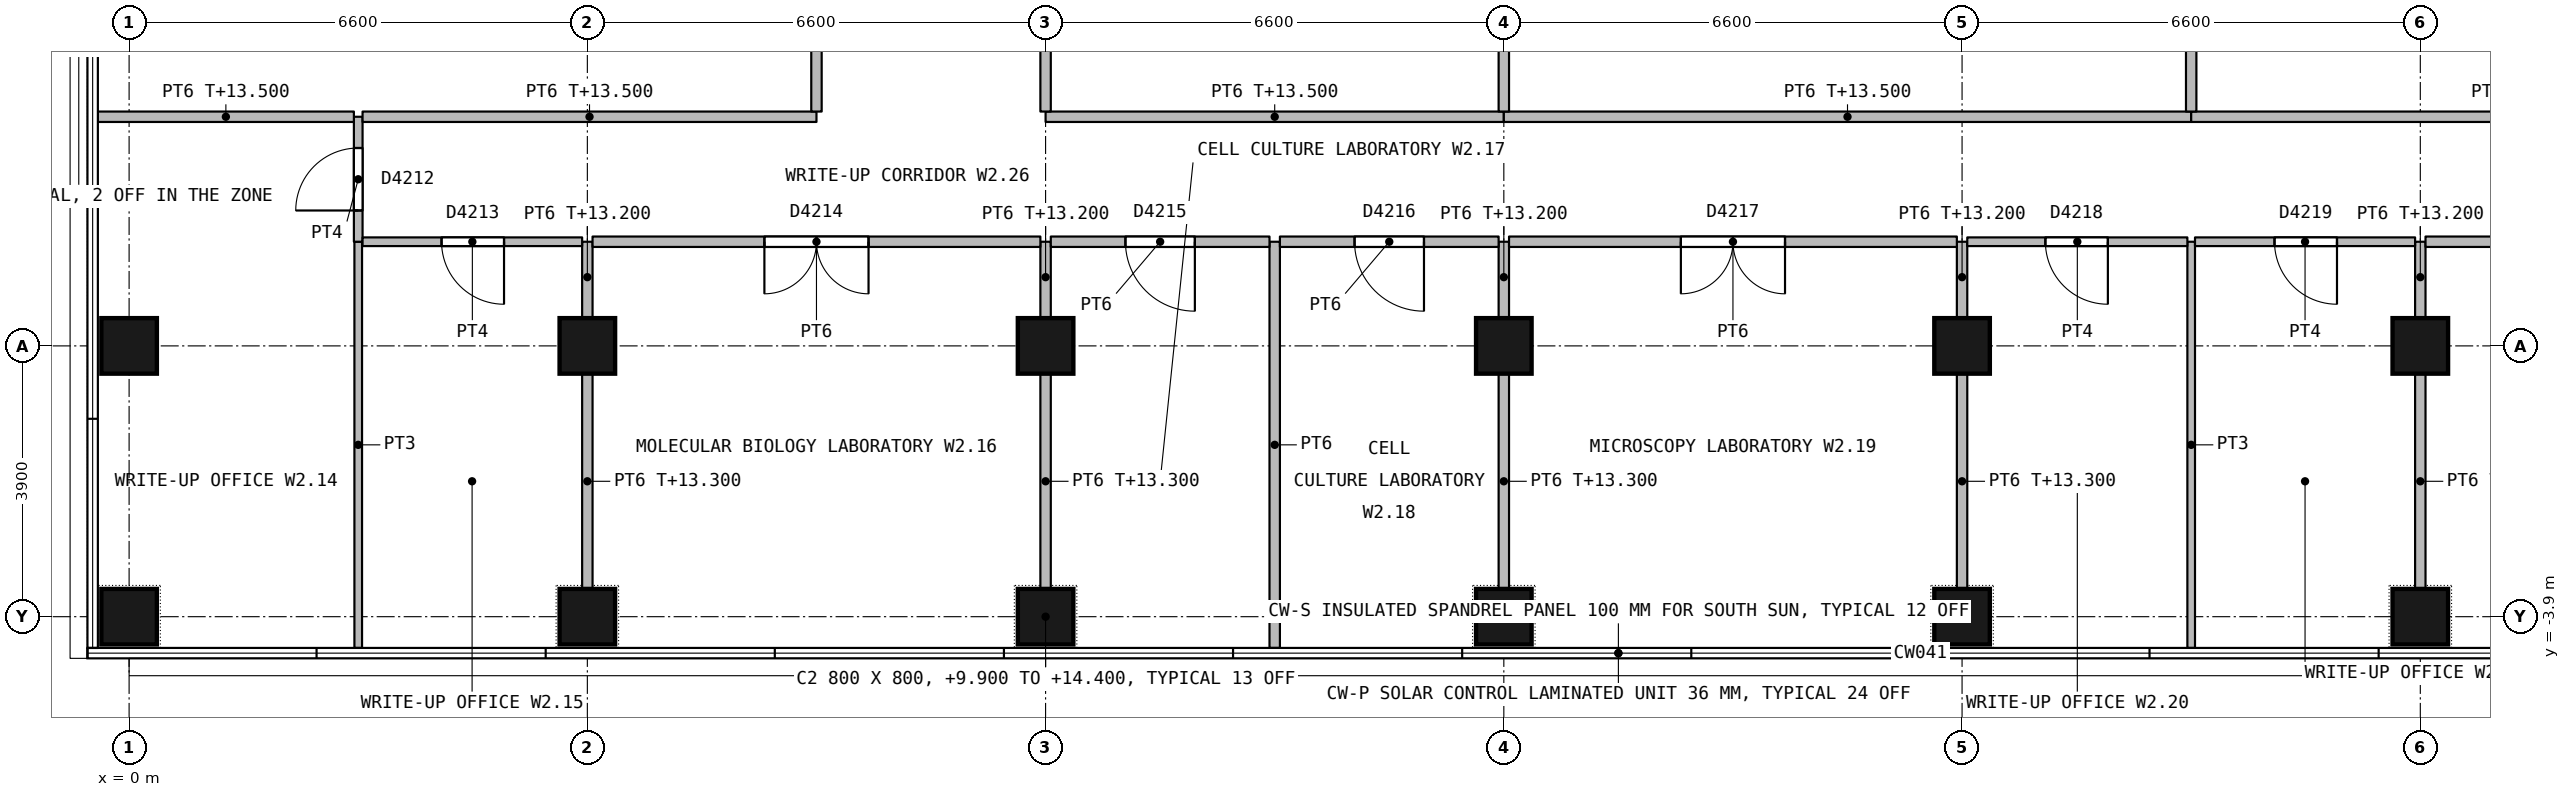
"""IFC4 building model, lengths in metres.
Left out: names, types, materials, properties, quantities, classifications, styles, units other than length and angle.
Written with IfcOpenShell. Run it as: python <this file> out.ifc"""

import sys

from ifc_helpers import new_model, si_unit, direction, frame, frame_2d, origin, origin_2d, place, context, subcontext, project, spatial, rectangle, extrude, element, fill, save


model = new_model("IFC4")
c1 = context("Model", 3, precision=1e-05, world=origin(), true_north=direction((0.0, 1.0)))
c2 = subcontext(c1, "Body", "Model", "MODEL_VIEW")
j1 = project(units=[si_unit("LENGTHUNIT", "METRE"), si_unit("PLANEANGLEUNIT", "RADIAN")], contexts=[c1])
p1 = place(None, origin())
s1 = spatial("IfcSite", under=j1, at=p1, CompositionType="ELEMENT")
p2 = place(p1, origin())
s2 = spatial("IfcBuilding", under=s1, at=p2, CompositionType="ELEMENT")
p3 = place(p2, frame((0.0, 0.0, 9.9)))
s3 = spatial("IfcBuildingStorey", under=s2, at=p3, CompositionType="ELEMENT", Elevation=9.9)
for number, where, z_axis, x_axis in (
    (1, (0.0, 0.0, 0.0), (0.0, 0.0, 1.0), (1.0, 0.0, 0.0)),
    (2, (6.6, 0.0, 0.0), (0.0, 0.0, 1.0), (1.0, 0.0, 0.0)),
    (3, (13.2, 0.0, 0.0), (0.0, 0.0, 1.0), (1.0, 0.0, 0.0)),
    (4, (19.8, 0.0, 0.0), (0.0, 0.0, 1.0), (1.0, 0.0, 0.0)),
    (5, (26.4, 0.0, 0.0), (0.0, 0.0, 1.0), (1.0, 0.0, 0.0)),
    (6, (33.0, 0.0, 0.0), (0.0, 0.0, 1.0), (1.0, 0.0, 0.0)),
    (7, (0.0, -3.9, 0.0), (0.0, 0.0, 1.0), (1.0, 0.0, 0.0)),
    (8, (6.6, -3.9, 0.0), (0.0, 0.0, 1.0), (1.0, 0.0, 0.0)),
    (9, (13.2, -3.9, 0.0), (0.0, 0.0, 1.0), (1.0, 0.0, 0.0)),
    (10, (19.8, -3.9, 0.0), (0.0, 0.0, 1.0), (1.0, 0.0, 0.0)),
    (11, (26.4, -3.9, 0.0), (0.0, 0.0, 1.0), (1.0, 0.0, 0.0)),
    (12, (33.0, -3.9, 0.0), (0.0, 0.0, 1.0), (1.0, 0.0, 0.0)),
):
    element("IfcColumn", number, at=place(p3, frame(where, z_axis=z_axis, x_axis=x_axis)), inside=s3, PredefinedType="COLUMN", context=c2, shape_type="SweptSolid", body=[
        extrude(rectangle(XDim=0.8, YDim=0.8, at=origin_2d()), origin(), (0.0, 0.0, 1.0), 4.5),
    ])
p4 = place(p3, frame((3.3, -4.35, 0.0), z_axis=(0.0, 0.0, 1.0), x_axis=(0.0, 1.0, 0.0)))
e13 = element("IfcWall", 13, at=p4, inside=s3, PredefinedType="PARTITIONING", context=c2, shape_type="SweptSolid", body=[
    extrude(rectangle(XDim=5.85, YDim=0.11, at=frame_2d((2.925, 0.0))), origin(), (0.0, 0.0, 1.0), 4.2),
])
p5 = place(p3, frame((3.3, 1.5, 0.0), z_axis=(0.0, 0.0, 1.0), x_axis=(0.0, 1.0, 0.0)))
e14 = element("IfcWall", 14, at=p5, inside=s3, PredefinedType="PARTITIONING", context=c2, shape_type="SweptSolid", body=[
    extrude(rectangle(XDim=1.8, YDim=0.125, at=frame_2d((0.9, 0.0))), origin(), (0.0, 0.0, 1.0), 4.2),
])
p6 = place(p5, frame((0.45, 0.0, 0.0)))
e15 = element("IfcOpeningElement", 15, at=p6, cuts=e14, PredefinedType="OPENING", context=c2, shape_type="SweptSolid", body=[
    extrude(rectangle(XDim=0.9, YDim=2.1, at=frame_2d((0.45, 1.05))), frame((0.0, 0.073, 0.0), z_axis=(0.0, -1.0, 0.0), x_axis=(1.0, 0.0, 0.0)), (0.0, 0.0, 1.0), 0.145),
])
p7 = place(p3, frame((3.238, 3.3, 0.0), z_axis=(0.0, 0.0, 1.0), x_axis=(-1.0, 0.0, 0.0)))
e16 = element("IfcWall", 16, at=p7, inside=s3, PredefinedType="PARTITIONING", context=c2, shape_type="SweptSolid", body=[
    extrude(rectangle(XDim=3.688, YDim=0.15, at=frame_2d((1.844, 0.0))), origin(), (0.0, 0.0, 1.0), 3.6),
])
p8 = place(p3, frame((6.6, -3.5, 0.0), z_axis=(0.0, 0.0, 1.0), x_axis=(0.0, 1.0, 0.0)))
e17 = element("IfcWall", 17, at=p8, inside=s3, PredefinedType="PARTITIONING", context=c2, shape_type="SweptSolid", body=[
    extrude(rectangle(XDim=3.1, YDim=0.15, at=frame_2d((1.55, 0.0))), origin(), (0.0, 0.0, 1.0), 3.4),
])
p9 = place(p3, frame((6.6, 0.4, 0.0), z_axis=(0.0, 0.0, 1.0), x_axis=(0.0, 1.0, 0.0)))
e18 = element("IfcWall", 18, at=p9, inside=s3, PredefinedType="PARTITIONING", context=c2, shape_type="SweptSolid", body=[
    extrude(rectangle(XDim=1.1, YDim=0.15, at=frame_2d((0.55, 0.0))), origin(), (0.0, 0.0, 1.0), 3.3),
])
p10 = place(p3, frame((6.525, 1.5, 0.0), z_axis=(0.0, 0.0, 1.0), x_axis=(-1.0, 0.0, 0.0)))
e19 = element("IfcWall", 19, at=p10, inside=s3, PredefinedType="PARTITIONING", context=c2, shape_type="SweptSolid", body=[
    extrude(rectangle(XDim=3.162, YDim=0.125, at=frame_2d((1.581, 0.0))), origin(), (0.0, 0.0, 1.0), 4.2),
])
p11 = place(p10, frame((1.125, 0.0, 0.0)))
e20 = element("IfcOpeningElement", 20, at=p11, cuts=e19, PredefinedType="OPENING", context=c2, shape_type="SweptSolid", body=[
    extrude(rectangle(XDim=0.9, YDim=2.1, at=frame_2d((0.45, 1.05))), frame((0.0, 0.073, 0.0), z_axis=(0.0, -1.0, 0.0), x_axis=(1.0, 0.0, 0.0)), (0.0, 0.0, 1.0), 0.145),
])
p12 = place(p3, frame((13.2, -3.5, 0.0), z_axis=(0.0, 0.0, 1.0), x_axis=(0.0, 1.0, 0.0)))
e21 = element("IfcWall", 21, at=p12, inside=s3, PredefinedType="PARTITIONING", context=c2, shape_type="SweptSolid", body=[
    extrude(rectangle(XDim=3.1, YDim=0.15, at=frame_2d((1.55, 0.0))), origin(), (0.0, 0.0, 1.0), 3.4),
])
p13 = place(p3, frame((13.2, 0.4, 0.0), z_axis=(0.0, 0.0, 1.0), x_axis=(0.0, 1.0, 0.0)))
e22 = element("IfcWall", 22, at=p13, inside=s3, PredefinedType="PARTITIONING", context=c2, shape_type="SweptSolid", body=[
    extrude(rectangle(XDim=1.1, YDim=0.15, at=frame_2d((0.55, 0.0))), origin(), (0.0, 0.0, 1.0), 3.3),
])
p14 = place(p3, frame((13.125, 1.5, 0.0), z_axis=(0.0, 0.0, 1.0), x_axis=(-1.0, 0.0, 0.0)))
e23 = element("IfcWall", 23, at=p14, inside=s3, PredefinedType="PARTITIONING", context=c2, shape_type="SweptSolid", body=[
    extrude(rectangle(XDim=6.45, YDim=0.15, at=frame_2d((3.225, 0.0))), origin(), (0.0, 0.0, 1.0), 4.2),
])
p15 = place(p14, frame((2.475, 0.0, 0.0)))
e24 = element("IfcOpeningElement", 24, at=p15, cuts=e23, PredefinedType="OPENING", context=c2, shape_type="SweptSolid", body=[
    extrude(rectangle(XDim=1.5, YDim=2.1, at=frame_2d((0.75, 1.05))), frame((0.0, 0.085, 0.0), z_axis=(0.0, -1.0, 0.0), x_axis=(1.0, 0.0, 0.0)), (0.0, 0.0, 1.0), 0.17),
])
p16 = place(p3, frame((16.5, -4.35, 0.0), z_axis=(0.0, 0.0, 1.0), x_axis=(0.0, 1.0, 0.0)))
e25 = element("IfcWall", 25, at=p16, inside=s3, PredefinedType="PARTITIONING", context=c2, shape_type="SweptSolid", body=[
    extrude(rectangle(XDim=5.85, YDim=0.15, at=frame_2d((2.925, 0.0))), origin(), (0.0, 0.0, 1.0), 4.2),
])
p17 = place(p3, frame((16.425, 1.5, 0.0), z_axis=(0.0, 0.0, 1.0), x_axis=(-1.0, 0.0, 0.0)))
e26 = element("IfcWall", 26, at=p17, inside=s3, PredefinedType="PARTITIONING", context=c2, shape_type="SweptSolid", body=[
    extrude(rectangle(XDim=3.15, YDim=0.15, at=frame_2d((1.575, 0.0))), origin(), (0.0, 0.0, 1.0), 4.2),
])
p18 = place(p17, frame((1.075, 0.0, 0.0)))
e27 = element("IfcOpeningElement", 27, at=p18, cuts=e26, PredefinedType="OPENING", context=c2, shape_type="SweptSolid", body=[
    extrude(rectangle(XDim=1.0, YDim=2.1, at=frame_2d((0.5, 1.05))), frame((0.0, 0.085, 0.0), z_axis=(0.0, -1.0, 0.0), x_axis=(1.0, 0.0, 0.0)), (0.0, 0.0, 1.0), 0.17),
])
p19 = place(p3, frame((19.8, -3.5, 0.0), z_axis=(0.0, 0.0, 1.0), x_axis=(0.0, 1.0, 0.0)))
e28 = element("IfcWall", 28, at=p19, inside=s3, PredefinedType="PARTITIONING", context=c2, shape_type="SweptSolid", body=[
    extrude(rectangle(XDim=3.1, YDim=0.15, at=frame_2d((1.55, 0.0))), origin(), (0.0, 0.0, 1.0), 3.4),
])
p20 = place(p3, frame((19.8, 0.4, 0.0), z_axis=(0.0, 0.0, 1.0), x_axis=(0.0, 1.0, 0.0)))
e29 = element("IfcWall", 29, at=p20, inside=s3, PredefinedType="PARTITIONING", context=c2, shape_type="SweptSolid", body=[
    extrude(rectangle(XDim=1.1, YDim=0.15, at=frame_2d((0.55, 0.0))), origin(), (0.0, 0.0, 1.0), 3.3),
])
p21 = place(p3, frame((19.725, 1.5, 0.0), z_axis=(0.0, 0.0, 1.0), x_axis=(-1.0, 0.0, 0.0)))
e30 = element("IfcWall", 30, at=p21, inside=s3, PredefinedType="PARTITIONING", context=c2, shape_type="SweptSolid", body=[
    extrude(rectangle(XDim=3.15, YDim=0.15, at=frame_2d((1.575, 0.0))), origin(), (0.0, 0.0, 1.0), 4.2),
])
p22 = place(p21, frame((1.075, 0.0, 0.0)))
e31 = element("IfcOpeningElement", 31, at=p22, cuts=e30, PredefinedType="OPENING", context=c2, shape_type="SweptSolid", body=[
    extrude(rectangle(XDim=1.0, YDim=2.1, at=frame_2d((0.5, 1.05))), frame((0.0, 0.085, 0.0), z_axis=(0.0, -1.0, 0.0), x_axis=(1.0, 0.0, 0.0)), (0.0, 0.0, 1.0), 0.17),
])
p23 = place(p3, frame((26.4, -3.5, 0.0), z_axis=(0.0, 0.0, 1.0), x_axis=(0.0, 1.0, 0.0)))
e32 = element("IfcWall", 32, at=p23, inside=s3, PredefinedType="PARTITIONING", context=c2, shape_type="SweptSolid", body=[
    extrude(rectangle(XDim=3.1, YDim=0.15, at=frame_2d((1.55, 0.0))), origin(), (0.0, 0.0, 1.0), 3.4),
])
p24 = place(p3, frame((26.4, 0.4, 0.0), z_axis=(0.0, 0.0, 1.0), x_axis=(0.0, 1.0, 0.0)))
e33 = element("IfcWall", 33, at=p24, inside=s3, PredefinedType="PARTITIONING", context=c2, shape_type="SweptSolid", body=[
    extrude(rectangle(XDim=1.1, YDim=0.15, at=frame_2d((0.55, 0.0))), origin(), (0.0, 0.0, 1.0), 3.3),
])
p25 = place(p3, frame((26.325, 1.5, 0.0), z_axis=(0.0, 0.0, 1.0), x_axis=(-1.0, 0.0, 0.0)))
e34 = element("IfcWall", 34, at=p25, inside=s3, PredefinedType="PARTITIONING", context=c2, shape_type="SweptSolid", body=[
    extrude(rectangle(XDim=6.45, YDim=0.15, at=frame_2d((3.225, 0.0))), origin(), (0.0, 0.0, 1.0), 4.2),
])
p26 = place(p25, frame((2.475, 0.0, 0.0)))
e35 = element("IfcOpeningElement", 35, at=p26, cuts=e34, PredefinedType="OPENING", context=c2, shape_type="SweptSolid", body=[
    extrude(rectangle(XDim=1.5, YDim=2.1, at=frame_2d((0.75, 1.05))), frame((0.0, 0.085, 0.0), z_axis=(0.0, -1.0, 0.0), x_axis=(1.0, 0.0, 0.0)), (0.0, 0.0, 1.0), 0.17),
])
p27 = place(p3, frame((29.7, -4.35, 0.0), z_axis=(0.0, 0.0, 1.0), x_axis=(0.0, 1.0, 0.0)))
e36 = element("IfcWall", 36, at=p27, inside=s3, PredefinedType="PARTITIONING", context=c2, shape_type="SweptSolid", body=[
    extrude(rectangle(XDim=5.85, YDim=0.11, at=frame_2d((2.925, 0.0))), origin(), (0.0, 0.0, 1.0), 4.2),
])
p28 = place(p3, frame((29.645, 1.5, 0.0), z_axis=(0.0, 0.0, 1.0), x_axis=(-1.0, 0.0, 0.0)))
e37 = element("IfcWall", 37, at=p28, inside=s3, PredefinedType="PARTITIONING", context=c2, shape_type="SweptSolid", body=[
    extrude(rectangle(XDim=3.17, YDim=0.125, at=frame_2d((1.585, 0.0))), origin(), (0.0, 0.0, 1.0), 4.2),
])
p29 = place(p28, frame((1.145, 0.0, 0.0)))
e38 = element("IfcOpeningElement", 38, at=p29, cuts=e37, PredefinedType="OPENING", context=c2, shape_type="SweptSolid", body=[
    extrude(rectangle(XDim=0.9, YDim=2.1, at=frame_2d((0.45, 1.05))), frame((0.0, 0.073, 0.0), z_axis=(0.0, -1.0, 0.0), x_axis=(1.0, 0.0, 0.0)), (0.0, 0.0, 1.0), 0.145),
])
p30 = place(p3, frame((33.0, -3.5, 0.0), z_axis=(0.0, 0.0, 1.0), x_axis=(0.0, 1.0, 0.0)))
e39 = element("IfcWall", 39, at=p30, inside=s3, PredefinedType="PARTITIONING", context=c2, shape_type="SweptSolid", body=[
    extrude(rectangle(XDim=3.1, YDim=0.15, at=frame_2d((1.55, 0.0))), origin(), (0.0, 0.0, 1.0), 3.4),
])
p31 = place(p3, frame((33.0, 0.4, 0.0), z_axis=(0.0, 0.0, 1.0), x_axis=(0.0, 1.0, 0.0)))
e40 = element("IfcWall", 40, at=p31, inside=s3, PredefinedType="PARTITIONING", context=c2, shape_type="SweptSolid", body=[
    extrude(rectangle(XDim=1.1, YDim=0.15, at=frame_2d((0.55, 0.0))), origin(), (0.0, 0.0, 1.0), 3.3),
])
p32 = place(p3, frame((32.925, 1.5, 0.0), z_axis=(0.0, 0.0, 1.0), x_axis=(-1.0, 0.0, 0.0)))
e41 = element("IfcWall", 41, at=p32, inside=s3, PredefinedType="PARTITIONING", context=c2, shape_type="SweptSolid", body=[
    extrude(rectangle(XDim=3.17, YDim=0.125, at=frame_2d((1.585, 0.0))), origin(), (0.0, 0.0, 1.0), 4.2),
])
p33 = place(p32, frame((1.125, 0.0, 0.0)))
e42 = element("IfcOpeningElement", 42, at=p33, cuts=e41, PredefinedType="OPENING", context=c2, shape_type="SweptSolid", body=[
    extrude(rectangle(XDim=0.9, YDim=2.1, at=frame_2d((0.45, 1.05))), frame((0.0, 0.073, 0.0), z_axis=(0.0, -1.0, 0.0), x_axis=(1.0, 0.0, 0.0)), (0.0, 0.0, 1.0), 0.145),
])
p34 = place(p3, frame((39.525, 1.5, 0.0), z_axis=(0.0, 0.0, 1.0), x_axis=(-1.0, 0.0, 0.0)))
e43 = element("IfcWall", 43, at=p34, inside=s3, PredefinedType="PARTITIONING", context=c2, shape_type="SweptSolid", body=[
    extrude(rectangle(XDim=6.45, YDim=0.15, at=frame_2d((3.225, 0.0))), origin(), (0.0, 0.0, 1.0), 4.2),
])
p35 = place(p34, frame((2.475, 0.0, 0.0)))
e44 = element("IfcOpeningElement", 44, at=p35, cuts=e43, PredefinedType="OPENING", context=c2, shape_type="SweptSolid", body=[
    extrude(rectangle(XDim=1.5, YDim=2.1, at=frame_2d((0.75, 1.05))), frame((0.0, 0.085, 0.0), z_axis=(0.0, -1.0, 0.0), x_axis=(1.0, 0.0, 0.0)), (0.0, 0.0, 1.0), 0.17),
])
p36 = place(p3, frame((9.9, 3.3, 0.0), z_axis=(0.0, 0.0, 1.0), x_axis=(-1.0, 0.0, 0.0)))
e45 = element("IfcWall", 45, at=p36, inside=s3, PredefinedType="PARTITIONING", context=c2, shape_type="SweptSolid", body=[
    extrude(rectangle(XDim=6.537, YDim=0.15, at=frame_2d((3.269, 0.0))), origin(), (0.0, 0.0, 1.0), 3.6),
])
p37 = place(p3, frame((19.8, 3.3, 0.0), z_axis=(0.0, 0.0, 1.0), x_axis=(-1.0, 0.0, 0.0)))
e46 = element("IfcWall", 46, at=p37, inside=s3, PredefinedType="PARTITIONING", context=c2, shape_type="SweptSolid", body=[
    extrude(rectangle(XDim=6.6, YDim=0.15, at=frame_2d((3.3, 0.0))), origin(), (0.0, 0.0, 1.0), 3.6),
])
p38 = place(p3, frame((29.7, 3.3, 0.0), z_axis=(0.0, 0.0, 1.0), x_axis=(-1.0, 0.0, 0.0)))
e47 = element("IfcWall", 47, at=p38, inside=s3, PredefinedType="PARTITIONING", context=c2, shape_type="SweptSolid", body=[
    extrude(rectangle(XDim=9.9, YDim=0.15, at=frame_2d((4.95, 0.0))), origin(), (0.0, 0.0, 1.0), 3.6),
])
p39 = place(p3, frame((39.6, 3.3, 0.0), z_axis=(0.0, 0.0, 1.0), x_axis=(-1.0, 0.0, 0.0)))
e48 = element("IfcWall", 48, at=p39, inside=s3, PredefinedType="PARTITIONING", context=c2, shape_type="SweptSolid", body=[
    extrude(rectangle(XDim=9.9, YDim=0.15, at=frame_2d((4.95, 0.0))), origin(), (0.0, 0.0, 1.0), 3.6),
])
p40 = place(p3, frame((9.9, 3.375, 0.0), z_axis=(0.0, 0.0, 1.0), x_axis=(0.0, 1.0, 0.0)))
e49 = element("IfcWall", 49, at=p40, inside=s3, PredefinedType="PARTITIONING", context=c2, shape_type="SweptSolid", body=[
    extrude(rectangle(XDim=6.45, YDim=0.15, at=frame_2d((3.225, 0.0))), origin(), (0.0, 0.0, 1.0), 4.2),
])
for number, where, z_axis, x_axis in (
    (50, (13.2, 3.375, 0.0), (0.0, 0.0, 1.0), (0.0, 1.0, 0.0)),
    (51, (19.8, 3.375, 0.0), (0.0, 0.0, 1.0), (0.0, 1.0, 0.0)),
):
    element("IfcWall", number, at=place(p3, frame(where, z_axis=z_axis, x_axis=x_axis)), inside=s3, PredefinedType="PARTITIONING", context=c2, shape_type="SweptSolid", body=[
        extrude(rectangle(XDim=6.125, YDim=0.15, at=frame_2d((3.062, 0.0))), origin(), (0.0, 0.0, 1.0), 3.3),
    ])
p41 = place(p3, frame((29.7, 3.375, 0.0), z_axis=(0.0, 0.0, 1.0), x_axis=(0.0, 1.0, 0.0)))
e52 = element("IfcWall", 52, at=p41, inside=s3, PredefinedType="PARTITIONING", context=c2, shape_type="SweptSolid", body=[
    extrude(rectangle(XDim=6.45, YDim=0.15, at=frame_2d((3.225, 0.0))), origin(), (0.0, 0.0, 1.0), 4.2),
])
p42 = place(p6, origin())
e53 = element("IfcDoor", 53, at=p42, inside=s3, OperationType="SINGLE_SWING_LEFT", PredefinedType="DOOR", context=c2, shape_type="SweptSolid", body=[
    extrude(rectangle(XDim=0.9, YDim=2.1, at=frame_2d((0.45, 1.05))), frame((0.0, 0.027, 0.0), z_axis=(0.0, -1.0, 0.0), x_axis=(1.0, 0.0, 0.0)), (0.0, 0.0, 1.0), 0.054),
])
fill(e15, e53)
p43 = place(p11, origin())
e54 = element("IfcDoor", 54, at=p43, inside=s3, OperationType="SINGLE_SWING_LEFT", PredefinedType="DOOR", context=c2, shape_type="SweptSolid", body=[
    extrude(rectangle(XDim=0.9, YDim=2.1, at=frame_2d((0.45, 1.05))), frame((0.0, 0.027, 0.0), z_axis=(0.0, -1.0, 0.0), x_axis=(1.0, 0.0, 0.0)), (0.0, 0.0, 1.0), 0.054),
])
fill(e20, e54)
p44 = place(p15, origin())
e55 = element("IfcDoor", 55, at=p44, inside=s3, OperationType="DOUBLE_DOOR_SINGLE_SWING", PredefinedType="DOOR", context=c2, shape_type="SweptSolid", body=[
    extrude(rectangle(XDim=1.5, YDim=2.1, at=frame_2d((0.75, 1.05))), frame((0.0, 0.027, 0.0), z_axis=(0.0, -1.0, 0.0), x_axis=(1.0, 0.0, 0.0)), (0.0, 0.0, 1.0), 0.054),
])
fill(e24, e55)
p45 = place(p18, origin())
e56 = element("IfcDoor", 56, at=p45, inside=s3, OperationType="SINGLE_SWING_LEFT", PredefinedType="DOOR", context=c2, shape_type="SweptSolid", body=[
    extrude(rectangle(XDim=1.0, YDim=2.1, at=frame_2d((0.5, 1.05))), frame((0.0, 0.027, 0.0), z_axis=(0.0, -1.0, 0.0), x_axis=(1.0, 0.0, 0.0)), (0.0, 0.0, 1.0), 0.054),
])
fill(e27, e56)
p46 = place(p22, origin())
e57 = element("IfcDoor", 57, at=p46, inside=s3, OperationType="SINGLE_SWING_LEFT", PredefinedType="DOOR", context=c2, shape_type="SweptSolid", body=[
    extrude(rectangle(XDim=1.0, YDim=2.1, at=frame_2d((0.5, 1.05))), frame((0.0, 0.027, 0.0), z_axis=(0.0, -1.0, 0.0), x_axis=(1.0, 0.0, 0.0)), (0.0, 0.0, 1.0), 0.054),
])
fill(e31, e57)
p47 = place(p26, origin())
e58 = element("IfcDoor", 58, at=p47, inside=s3, OperationType="DOUBLE_DOOR_SINGLE_SWING", PredefinedType="DOOR", context=c2, shape_type="SweptSolid", body=[
    extrude(rectangle(XDim=1.5, YDim=2.1, at=frame_2d((0.75, 1.05))), frame((0.0, 0.027, 0.0), z_axis=(0.0, -1.0, 0.0), x_axis=(1.0, 0.0, 0.0)), (0.0, 0.0, 1.0), 0.054),
])
fill(e35, e58)
p48 = place(p29, origin())
e59 = element("IfcDoor", 59, at=p48, inside=s3, OperationType="SINGLE_SWING_LEFT", PredefinedType="DOOR", context=c2, shape_type="SweptSolid", body=[
    extrude(rectangle(XDim=0.9, YDim=2.1, at=frame_2d((0.45, 1.05))), frame((0.0, 0.027, 0.0), z_axis=(0.0, -1.0, 0.0), x_axis=(1.0, 0.0, 0.0)), (0.0, 0.0, 1.0), 0.054),
])
fill(e38, e59)
p49 = place(p33, origin())
e60 = element("IfcDoor", 60, at=p49, inside=s3, OperationType="SINGLE_SWING_LEFT", PredefinedType="DOOR", context=c2, shape_type="SweptSolid", body=[
    extrude(rectangle(XDim=0.9, YDim=2.1, at=frame_2d((0.45, 1.05))), frame((0.0, 0.027, 0.0), z_axis=(0.0, -1.0, 0.0), x_axis=(1.0, 0.0, 0.0)), (0.0, 0.0, 1.0), 0.054),
])
fill(e42, e60)
save(model, sys.argv[1])
